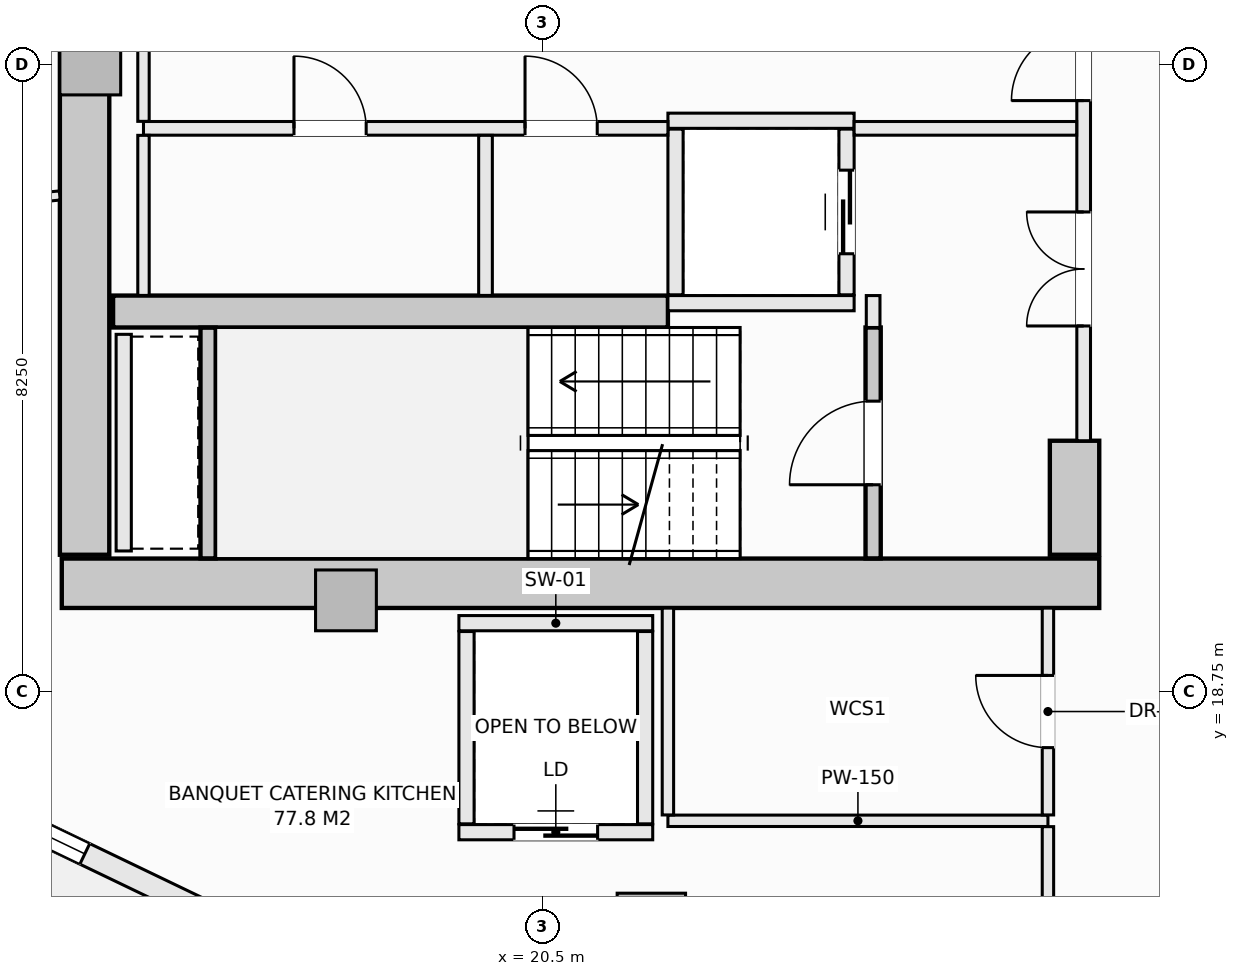
"""IFC4 building model, lengths in metres.
Left out: names, types, materials, properties, quantities, classifications, styles, units other than length and angle.
Written with IfcOpenShell. Run it as: python <this file> out.ifc"""

import sys

from ifc_helpers import new_model, si_unit, direction, frame, frame_2d, origin, origin_2d, place, context, subcontext, project, spatial, rectangle, extrude, element, fill, save


model = new_model("IFC4")
c1 = context("Model", 3, precision=1e-05, world=origin(), true_north=direction((0.0, 1.0)))
c2 = subcontext(c1, "Body", "Model", "MODEL_VIEW")
j1 = project(units=[si_unit("LENGTHUNIT", "METRE"), si_unit("PLANEANGLEUNIT", "RADIAN")], contexts=[c1])
p1 = place(None, origin())
s1 = spatial("IfcSite", under=j1, at=p1, CompositionType="ELEMENT")
p2 = place(p1, origin())
s2 = spatial("IfcBuilding", under=s1, at=p2, CompositionType="ELEMENT")
p3 = place(p2, frame((0.0, 0.0, 146.1)))
s3 = spatial("IfcBuildingStorey", under=s2, at=p3, CompositionType="ELEMENT", Elevation=146.1)
p4 = place(p3, frame((14.175, 20.175, -0.27), z_axis=(0.0, 0.0, 1.0), x_axis=(1.0, 0.0, 0.0)))
e1 = element("IfcWall", 1, at=p4, inside=s3, PredefinedType="SHEAR", context=c2, shape_type="SweptSolid", body=[
    extrude(rectangle(XDim=13.65, YDim=0.65, at=frame_2d((6.825, 0.0))), origin(), (0.0, 0.0, 1.0), 3.4),
])
p5 = place(p3, frame((14.475, 20.55, -0.27), z_axis=(0.0, 0.0, 1.0), x_axis=(0.0, 1.0, 0.0)))
e2 = element("IfcWall", 2, at=p5, inside=s3, PredefinedType="SHEAR", context=c2, shape_type="SweptSolid", body=[
    extrude(rectangle(XDim=12.9, YDim=0.65, at=frame_2d((6.45, 0.0))), origin(), (0.0, 0.0, 1.0), 3.4),
])
p6 = place(p3, frame((27.5, 20.55, -0.27), z_axis=(0.0, 0.0, 1.0), x_axis=(0.0, 1.0, 0.0)))
e3 = element("IfcWall", 3, at=p6, inside=s3, PredefinedType="SHEAR", context=c2, shape_type="SweptSolid", body=[
    extrude(rectangle(XDim=1.5, YDim=0.65, at=frame_2d((0.75, 0.0))), origin(), (0.0, 0.0, 1.0), 3.4),
])
p7 = place(p3, frame((14.85, 23.75, -0.27), z_axis=(0.0, 0.0, 1.0), x_axis=(1.0, 0.0, 0.0)))
e4 = element("IfcWall", 4, at=p7, inside=s3, PredefinedType="SHEAR", context=c2, shape_type="SweptSolid", body=[
    extrude(rectangle(XDim=7.3, YDim=0.42, at=frame_2d((3.65, 0.0))), origin(), (0.0, 0.0, 1.0), 3.4),
])
p8 = place(p3, frame((21.932, 15.648, -0.27), z_axis=(0.0, 0.0, 1.0), x_axis=(1.0, 0.0, 0.0)))
e5 = element("IfcColumn", 5, at=p8, inside=s3, PredefinedType="COLUMN", context=c2, shape_type="SweptSolid", body=[
    extrude(rectangle(XDim=0.9, YDim=0.9, at=origin_2d()), origin(), (0.0, 0.0, 1.0), 3.4),
])
for number, where, z_axis, x_axis in (
    (6, (14.55, 27.0, -0.27), (0.0, 0.0, 1.0), (1.0, 0.0, 0.0)),
    (7, (17.914, 19.95, -0.27), (0.0, 0.0, 1.0), (1.0, 0.0, 0.0)),
):
    element("IfcColumn", number, at=place(p3, frame(where, z_axis=z_axis, x_axis=x_axis)), inside=s3, PredefinedType="PILASTER", context=c2, shape_type="SweptSolid", body=[
        extrude(rectangle(XDim=0.8, YDim=0.8, at=origin_2d()), origin(), (0.0, 0.0, 1.0), 3.4),
    ])
p9 = place(p3, frame((11.127, 18.225, 0.0), z_axis=(0.0, 0.0, 1.0), x_axis=(0.901353070301, -0.433085029363, 0.0)))
e8 = element("IfcWall", 8, at=p9, inside=s3, PredefinedType="SOLIDWALL", context=c2, shape_type="SweptSolid", body=[
    extrude(rectangle(XDim=5.336, YDim=0.3, at=frame_2d((2.668, 0.0))), origin(), (0.0, 0.0, 1.0), 2.653),
])
p10 = place(p9, frame((1.618, 0.0, 0.74)))
e9 = element("IfcOpeningElement", 9, at=p10, cuts=e8, PredefinedType="OPENING", context=c2, shape_type="SweptSolid", body=[
    extrude(rectangle(XDim=2.1, YDim=1.7, at=frame_2d((1.05, 0.85))), frame((0.0, 0.16, 0.0), z_axis=(0.0, -1.0, 0.0), x_axis=(1.0, 0.0, 0.0)), (0.0, 0.0, 1.0), 0.32),
])
p11 = place(p3, frame((24.85, 20.502, -0.27), z_axis=(0.0, 0.0, 1.0), x_axis=(0.0, 1.0, 0.0)))
e10 = element("IfcWall", 10, at=p11, inside=s3, PredefinedType="SHEAR", context=c2, shape_type="SweptSolid", body=[
    extrude(rectangle(XDim=3.038, YDim=0.2, at=frame_2d((1.519, 0.0))), origin(), (0.0, 0.0, 1.0), 3.4),
])
p12 = place(p11, frame((0.969, 0.0, 0.27)))
e11 = element("IfcOpeningElement", 11, at=p12, cuts=e10, PredefinedType="OPENING", context=c2, shape_type="SweptSolid", body=[
    extrude(rectangle(XDim=1.1, YDim=2.15, at=frame_2d((0.55, 1.075))), frame((0.0, 0.11, 0.0), z_axis=(0.0, -1.0, 0.0), x_axis=(1.0, 0.0, 0.0)), (0.0, 0.0, 1.0), 0.22),
])
p13 = place(p3, frame((16.1, 20.502, -0.27), z_axis=(0.0, 0.0, 1.0), x_axis=(0.0, 1.0, 0.0)))
e12 = element("IfcWall", 12, at=p13, inside=s3, PredefinedType="SHEAR", context=c2, shape_type="SweptSolid", body=[
    extrude(rectangle(XDim=3.036, YDim=0.2, at=frame_2d((1.518, 0.0))), origin(), (0.0, 0.0, 1.0), 3.4),
])
for number, where, z_axis, x_axis in (
    (13, (22.15, 26.26, 0.0), (0.0, 0.0, 1.0), (1.0, 0.0, 0.0)),
    (14, (22.15, 23.86, 0.0), (0.0, 0.0, 1.0), (1.0, 0.0, 0.0)),
):
    element("IfcWall", number, at=place(p3, frame(where, z_axis=z_axis, x_axis=x_axis)), inside=s3, PredefinedType="SOLIDWALL", context=c2, shape_type="SweptSolid", body=[
        extrude(rectangle(XDim=2.45, YDim=0.2, at=frame_2d((1.225, 0.0))), origin(), (0.0, 0.0, 1.0), 3.13),
    ])
p14 = place(p3, frame((22.25, 23.97, 0.0), z_axis=(0.0, 0.0, 1.0), x_axis=(0.0, 1.0, 0.0)))
e15 = element("IfcWall", 15, at=p14, inside=s3, PredefinedType="SOLIDWALL", context=c2, shape_type="SweptSolid", body=[
    extrude(rectangle(XDim=2.18, YDim=0.2, at=frame_2d((1.09, 0.0))), origin(), (0.0, 0.0, 1.0), 3.13),
])
p15 = place(p3, frame((24.5, 23.97, 0.0), z_axis=(0.0, 0.0, 1.0), x_axis=(0.0, 1.0, 0.0)))
e16 = element("IfcWall", 16, at=p15, inside=s3, PredefinedType="SOLIDWALL", context=c2, shape_type="SweptSolid", body=[
    extrude(rectangle(XDim=2.18, YDim=0.2, at=frame_2d((1.09, 0.0))), origin(), (0.0, 0.0, 1.0), 3.13),
])
p16 = place(p15, frame((0.54, 0.0, 0.0)))
e17 = element("IfcOpeningElement", 17, at=p16, cuts=e16, PredefinedType="OPENING", context=c2, shape_type="SweptSolid", body=[
    extrude(rectangle(XDim=1.1, YDim=2.2, at=frame_2d((0.55, 1.1))), frame((0.0, 0.11, 0.0), z_axis=(0.0, -1.0, 0.0), x_axis=(1.0, 0.0, 0.0)), (0.0, 0.0, 1.0), 0.22),
])
p17 = place(p3, frame((19.4, 19.65, 0.0), z_axis=(0.0, 0.0, 1.0), x_axis=(1.0, 0.0, 0.0)))
e18 = element("IfcWall", 18, at=p17, inside=s3, PredefinedType="SOLIDWALL", context=c2, shape_type="SweptSolid", body=[
    extrude(rectangle(XDim=2.55, YDim=0.2, at=frame_2d((1.275, 0.0))), origin(), (0.0, 0.0, 1.0), 3.13),
])
p18 = place(p3, frame((19.4, 16.9, 0.0), z_axis=(0.0, 0.0, 1.0), x_axis=(1.0, 0.0, 0.0)))
e19 = element("IfcWall", 19, at=p18, inside=s3, PredefinedType="SOLIDWALL", context=c2, shape_type="SweptSolid", body=[
    extrude(rectangle(XDim=2.55, YDim=0.2, at=frame_2d((1.275, 0.0))), origin(), (0.0, 0.0, 1.0), 3.13),
])
p19 = place(p18, frame((0.725, 0.0, 0.0)))
e20 = element("IfcOpeningElement", 20, at=p19, cuts=e19, PredefinedType="OPENING", context=c2, shape_type="SweptSolid", body=[
    extrude(rectangle(XDim=1.1, YDim=2.2, at=frame_2d((0.55, 1.1))), frame((0.0, 0.11, 0.0), z_axis=(0.0, -1.0, 0.0), x_axis=(1.0, 0.0, 0.0)), (0.0, 0.0, 1.0), 0.22),
])
for number, where, z_axis, x_axis in (
    (21, (19.5, 17.01, 0.0), (0.0, 0.0, 1.0), (0.0, 1.0, 0.0)),
    (22, (21.85, 17.01, 0.0), (0.0, 0.0, 1.0), (0.0, 1.0, 0.0)),
):
    element("IfcWall", number, at=place(p3, frame(where, z_axis=z_axis, x_axis=x_axis)), inside=s3, PredefinedType="SOLIDWALL", context=c2, shape_type="SweptSolid", body=[
        extrude(rectangle(XDim=2.53, YDim=0.2, at=frame_2d((1.265, 0.0))), origin(), (0.0, 0.0, 1.0), 3.13),
    ])
p20 = place(p3, frame((14.99, 20.6, 0.0), z_axis=(0.0, 0.0, 1.0), x_axis=(0.0, 1.0, 0.0)))
e23 = element("IfcWall", 23, at=p20, inside=s3, PredefinedType="SOLIDWALL", context=c2, shape_type="SweptSolid", body=[
    extrude(rectangle(XDim=2.85, YDim=0.2, at=frame_2d((1.425, 0.0))), origin(), (0.0, 0.0, 1.0), 3.13),
])
p21 = place(p3, frame((24.85, 23.54, 0.0), z_axis=(0.0, 0.0, 1.0), x_axis=(0.0, 1.0, 0.0)))
e24 = element("IfcWall", 24, at=p21, inside=s3, PredefinedType="SOLIDWALL", context=c2, shape_type="SweptSolid", body=[
    extrude(rectangle(XDim=0.42, YDim=0.18, at=frame_2d((0.21, 0.0))), origin(), (0.0, 0.0, 1.0), 3.13),
])
p22 = place(p3, frame((27.62, 22.05, 0.0), z_axis=(0.0, 0.0, 1.0), x_axis=(0.0, 1.0, 0.0)))
e25 = element("IfcWall", 25, at=p22, inside=s3, PredefinedType="SOLIDWALL", context=c2, shape_type="SweptSolid", body=[
    extrude(rectangle(XDim=9.9, YDim=0.18, at=frame_2d((4.95, 0.0))), origin(), (0.0, 0.0, 1.0), 3.13),
])
p23 = place(p22, frame((4.475, 0.0, 0.0)))
e26 = element("IfcOpeningElement", 26, at=p23, cuts=e25, PredefinedType="OPENING", context=c2, shape_type="SweptSolid", body=[
    extrude(rectangle(XDim=0.95, YDim=2.1, at=frame_2d((0.475, 1.05))), frame((0.0, 0.1, 0.0), z_axis=(0.0, -1.0, 0.0), x_axis=(1.0, 0.0, 0.0)), (0.0, 0.0, 1.0), 0.2),
])
p24 = place(p22, frame((6.89, 0.0, 0.0)))
e27 = element("IfcOpeningElement", 27, at=p24, cuts=e25, PredefinedType="OPENING", context=c2, shape_type="SweptSolid", body=[
    extrude(rectangle(XDim=1.5, YDim=2.2, at=frame_2d((0.75, 1.1))), frame((0.0, 0.1, 0.0), z_axis=(0.0, -1.0, 0.0), x_axis=(1.0, 0.0, 0.0)), (0.0, 0.0, 1.0), 0.2),
])
p25 = place(p22, frame((1.51, 0.0, 0.0)))
e28 = element("IfcOpeningElement", 28, at=p25, cuts=e25, PredefinedType="OPENING", context=c2, shape_type="SweptSolid", body=[
    extrude(rectangle(XDim=1.5, YDim=2.2, at=frame_2d((0.75, 1.1))), frame((0.0, 0.1, 0.0), z_axis=(0.0, -1.0, 0.0), x_axis=(1.0, 0.0, 0.0)), (0.0, 0.0, 1.0), 0.2),
])
p26 = place(p3, frame((15.25, 26.16, 0.0), z_axis=(0.0, 0.0, 1.0), x_axis=(1.0, 0.0, 0.0)))
e29 = element("IfcWall", 29, at=p26, inside=s3, PredefinedType="SOLIDWALL", context=c2, shape_type="SweptSolid", body=[
    extrude(rectangle(XDim=6.9, YDim=0.18, at=frame_2d((3.45, 0.0))), origin(), (0.0, 0.0, 1.0), 3.13),
])
p27 = place(p26, frame((5.02, 0.0, 0.0)))
e30 = element("IfcOpeningElement", 30, at=p27, cuts=e29, PredefinedType="OPENING", context=c2, shape_type="SweptSolid", body=[
    extrude(rectangle(XDim=0.95, YDim=2.1, at=frame_2d((0.475, 1.05))), frame((0.0, 0.1, 0.0), z_axis=(0.0, -1.0, 0.0), x_axis=(1.0, 0.0, 0.0)), (0.0, 0.0, 1.0), 0.2),
])
p28 = place(p26, frame((1.98, 0.0, 0.0)))
e31 = element("IfcOpeningElement", 31, at=p28, cuts=e29, PredefinedType="OPENING", context=c2, shape_type="SweptSolid", body=[
    extrude(rectangle(XDim=0.95, YDim=2.1, at=frame_2d((0.475, 1.05))), frame((0.0, 0.1, 0.0), z_axis=(0.0, -1.0, 0.0), x_axis=(1.0, 0.0, 0.0)), (0.0, 0.0, 1.0), 0.2),
])
p29 = place(p3, frame((24.6, 26.16, 0.0), z_axis=(0.0, 0.0, 1.0), x_axis=(1.0, 0.0, 0.0)))
e32 = element("IfcWall", 32, at=p29, inside=s3, PredefinedType="SOLIDWALL", context=c2, shape_type="SweptSolid", body=[
    extrude(rectangle(XDim=2.928, YDim=0.18, at=frame_2d((1.464, 0.0))), origin(), (0.0, 0.0, 1.0), 3.13),
])
p30 = place(p3, frame((15.25, 23.962, 0.0), z_axis=(0.0, 0.0, 1.0), x_axis=(0.0, 1.0, 0.0)))
e33 = element("IfcWall", 33, at=p30, inside=s3, PredefinedType="PARTITIONING", context=c2, shape_type="SweptSolid", body=[
    extrude(rectangle(XDim=2.106, YDim=0.15, at=frame_2d((1.053, 0.0))), origin(), (0.0, 0.0, 1.0), 3.13),
])
p31 = place(p3, frame((15.25, 26.252, 0.0), z_axis=(0.0, 0.0, 1.0), x_axis=(0.0, 1.0, 0.0)))
e34 = element("IfcWall", 34, at=p31, inside=s3, PredefinedType="PARTITIONING", context=c2, shape_type="SweptSolid", body=[
    extrude(rectangle(XDim=1.496, YDim=0.15, at=frame_2d((0.748, 0.0))), origin(), (0.0, 0.0, 1.0), 3.13),
])
p32 = place(p3, frame((19.75, 23.962, 0.0), z_axis=(0.0, 0.0, 1.0), x_axis=(0.0, 1.0, 0.0)))
e35 = element("IfcWall", 35, at=p32, inside=s3, PredefinedType="SOLIDWALL", context=c2, shape_type="SweptSolid", body=[
    extrude(rectangle(XDim=2.106, YDim=0.18, at=frame_2d((1.053, 0.0))), origin(), (0.0, 0.0, 1.0), 3.13),
])
p33 = place(p3, frame((22.15, 17.05, 0.0), z_axis=(0.0, 0.0, 1.0), x_axis=(1.0, 0.0, 0.0)))
e36 = element("IfcWall", 36, at=p33, inside=s3, PredefinedType="PARTITIONING", context=c2, shape_type="SweptSolid", body=[
    extrude(rectangle(XDim=5.0, YDim=0.15, at=frame_2d((2.5, 0.0))), origin(), (0.0, 0.0, 1.0), 3.13),
])
p34 = place(p3, frame((22.15, 17.127, 0.0), z_axis=(0.0, 0.0, 1.0), x_axis=(0.0, 1.0, 0.0)))
e37 = element("IfcWall", 37, at=p34, inside=s3, PredefinedType="PARTITIONING", context=c2, shape_type="SweptSolid", body=[
    extrude(rectangle(XDim=2.721, YDim=0.15, at=frame_2d((1.36, 0.0))), origin(), (0.0, 0.0, 1.0), 3.13),
])
p35 = place(p3, frame((27.15, 12.056, 0.0), z_axis=(0.0, 0.0, 1.0), x_axis=(0.0, 1.0, 0.0)))
e38 = element("IfcWall", 38, at=p35, inside=s3, PredefinedType="PARTITIONING", context=c2, shape_type="SweptSolid", body=[
    extrude(rectangle(XDim=4.917, YDim=0.15, at=frame_2d((2.458, 0.0))), origin(), (0.0, 0.0, 1.0), 3.13),
])
p36 = place(p35, frame((2.948, 0.0, 0.0)))
e39 = element("IfcOpeningElement", 39, at=p36, cuts=e38, PredefinedType="OPENING", context=c2, shape_type="SweptSolid", body=[
    extrude(rectangle(XDim=0.95, YDim=2.1, at=frame_2d((0.475, 1.05))), frame((0.0, 0.085, 0.0), z_axis=(0.0, -1.0, 0.0), x_axis=(1.0, 0.0, 0.0)), (0.0, 0.0, 1.0), 0.17),
])
p37 = place(p3, frame((27.15, 17.127, 0.0), z_axis=(0.0, 0.0, 1.0), x_axis=(0.0, 1.0, 0.0)))
e40 = element("IfcWall", 40, at=p37, inside=s3, PredefinedType="PARTITIONING", context=c2, shape_type="SweptSolid", body=[
    extrude(rectangle(XDim=2.721, YDim=0.15, at=frame_2d((1.36, 0.0))), origin(), (0.0, 0.0, 1.0), 3.13),
])
p38 = place(p37, frame((0.885, 0.0, 0.0)))
e41 = element("IfcOpeningElement", 41, at=p38, cuts=e40, PredefinedType="OPENING", context=c2, shape_type="SweptSolid", body=[
    extrude(rectangle(XDim=0.95, YDim=2.1, at=frame_2d((0.475, 1.05))), frame((0.0, 0.085, 0.0), z_axis=(0.0, -1.0, 0.0), x_axis=(1.0, 0.0, 0.0)), (0.0, 0.0, 1.0), 0.17),
])
p39 = place(p3, frame((8.714, 24.735, 0.0), z_axis=(0.0, 0.0, 1.0), x_axis=(0.995066803819, 0.099207136527, 0.0)))
e42 = element("IfcWall", 42, at=p39, inside=s3, PredefinedType="PARTITIONING", context=c2, shape_type="SweptSolid", body=[
    extrude(rectangle(XDim=5.461, YDim=0.12, at=frame_2d((2.73, 0.0))), origin(), (0.0, 0.0, 1.0), 3.13),
])
p40 = place(p3, frame((8.479, 26.162, 0.0), z_axis=(0.0, 0.0, 1.0), x_axis=(0.927622844305, 0.373518217392, 0.0)))
e43 = element("IfcWall", 43, at=p40, inside=s3, PredefinedType="PARTITIONING", context=c2, shape_type="SweptSolid", body=[
    extrude(rectangle(XDim=6.111, YDim=0.15, at=frame_2d((3.055, 0.0))), origin(), (0.0, 0.0, 1.0), 2.505),
])
p41 = place(p10, origin())
e44 = element("IfcWindow", 44, at=p41, inside=s3, PartitioningType="SINGLE_PANEL", PredefinedType="WINDOW", context=c2, shape_type="SweptSolid", body=[
    extrude(rectangle(XDim=2.1, YDim=1.7, at=frame_2d((1.05, 0.85))), frame((0.0, 0.03, 0.0), z_axis=(0.0, -1.0, 0.0), x_axis=(1.0, 0.0, 0.0)), (0.0, 0.0, 1.0), 0.06),
])
fill(e9, e44)
p42 = place(p12, origin())
e45 = element("IfcDoor", 45, at=p42, inside=s3, OperationType="SINGLE_SWING_LEFT", PredefinedType="DOOR", context=c2, shape_type="SweptSolid", body=[
    extrude(rectangle(XDim=1.1, YDim=2.15, at=frame_2d((0.55, 1.075))), frame((0.0, 0.025, 0.0), z_axis=(0.0, -1.0, 0.0), x_axis=(1.0, 0.0, 0.0)), (0.0, 0.0, 1.0), 0.05),
])
fill(e11, e45)
p43 = place(p16, origin())
e46 = element("IfcDoor", 46, at=p43, inside=s3, OperationType="SLIDING_TO_LEFT", PredefinedType="DOOR", context=c2, shape_type="SweptSolid", body=[
    extrude(rectangle(XDim=1.1, YDim=2.2, at=frame_2d((0.55, 1.1))), frame((0.0, 0.025, 0.0), z_axis=(0.0, -1.0, 0.0), x_axis=(1.0, 0.0, 0.0)), (0.0, 0.0, 1.0), 0.05),
])
fill(e17, e46)
p44 = place(p19, origin())
e47 = element("IfcDoor", 47, at=p44, inside=s3, OperationType="SLIDING_TO_LEFT", PredefinedType="DOOR", context=c2, shape_type="SweptSolid", body=[
    extrude(rectangle(XDim=1.1, YDim=2.2, at=frame_2d((0.55, 1.1))), frame((0.0, 0.025, 0.0), z_axis=(0.0, -1.0, 0.0), x_axis=(1.0, 0.0, 0.0)), (0.0, 0.0, 1.0), 0.05),
])
fill(e20, e47)
p45 = place(p23, origin())
e48 = element("IfcDoor", 48, at=p45, inside=s3, OperationType="SINGLE_SWING_LEFT", PredefinedType="DOOR", context=c2, shape_type="SweptSolid", body=[
    extrude(rectangle(XDim=0.95, YDim=2.1, at=frame_2d((0.475, 1.05))), frame((0.0, 0.025, 0.0), z_axis=(0.0, -1.0, 0.0), x_axis=(1.0, 0.0, 0.0)), (0.0, 0.0, 1.0), 0.05),
])
fill(e26, e48)
p46 = place(p25, origin())
e49 = element("IfcDoor", 49, at=p46, inside=s3, OperationType="DOUBLE_DOOR_SINGLE_SWING", PredefinedType="DOOR", context=c2, shape_type="SweptSolid", body=[
    extrude(rectangle(XDim=1.5, YDim=2.2, at=frame_2d((0.75, 1.1))), frame((0.0, 0.025, 0.0), z_axis=(0.0, -1.0, 0.0), x_axis=(1.0, 0.0, 0.0)), (0.0, 0.0, 1.0), 0.05),
])
fill(e28, e49)
p47 = place(p27, origin())
e50 = element("IfcDoor", 50, at=p47, inside=s3, OperationType="SINGLE_SWING_LEFT", PredefinedType="DOOR", context=c2, shape_type="SweptSolid", body=[
    extrude(rectangle(XDim=0.95, YDim=2.1, at=frame_2d((0.475, 1.05))), frame((0.0, 0.025, 0.0), z_axis=(0.0, -1.0, 0.0), x_axis=(1.0, 0.0, 0.0)), (0.0, 0.0, 1.0), 0.05),
])
fill(e30, e50)
p48 = place(p28, origin())
e51 = element("IfcDoor", 51, at=p48, inside=s3, OperationType="SINGLE_SWING_LEFT", PredefinedType="DOOR", context=c2, shape_type="SweptSolid", body=[
    extrude(rectangle(XDim=0.95, YDim=2.1, at=frame_2d((0.475, 1.05))), frame((0.0, 0.025, 0.0), z_axis=(0.0, -1.0, 0.0), x_axis=(1.0, 0.0, 0.0)), (0.0, 0.0, 1.0), 0.05),
])
fill(e31, e51)
p49 = place(p38, origin())
e52 = element("IfcDoor", 52, at=p49, inside=s3, OperationType="SINGLE_SWING_RIGHT", PredefinedType="DOOR", context=c2, shape_type="SweptSolid", body=[
    extrude(rectangle(XDim=0.95, YDim=2.1, at=frame_2d((0.475, 1.05))), frame((0.0, 0.025, 0.0), z_axis=(0.0, -1.0, 0.0), x_axis=(1.0, 0.0, 0.0)), (0.0, 0.0, 1.0), 0.05),
])
fill(e41, e52)
save(model, sys.argv[1])
